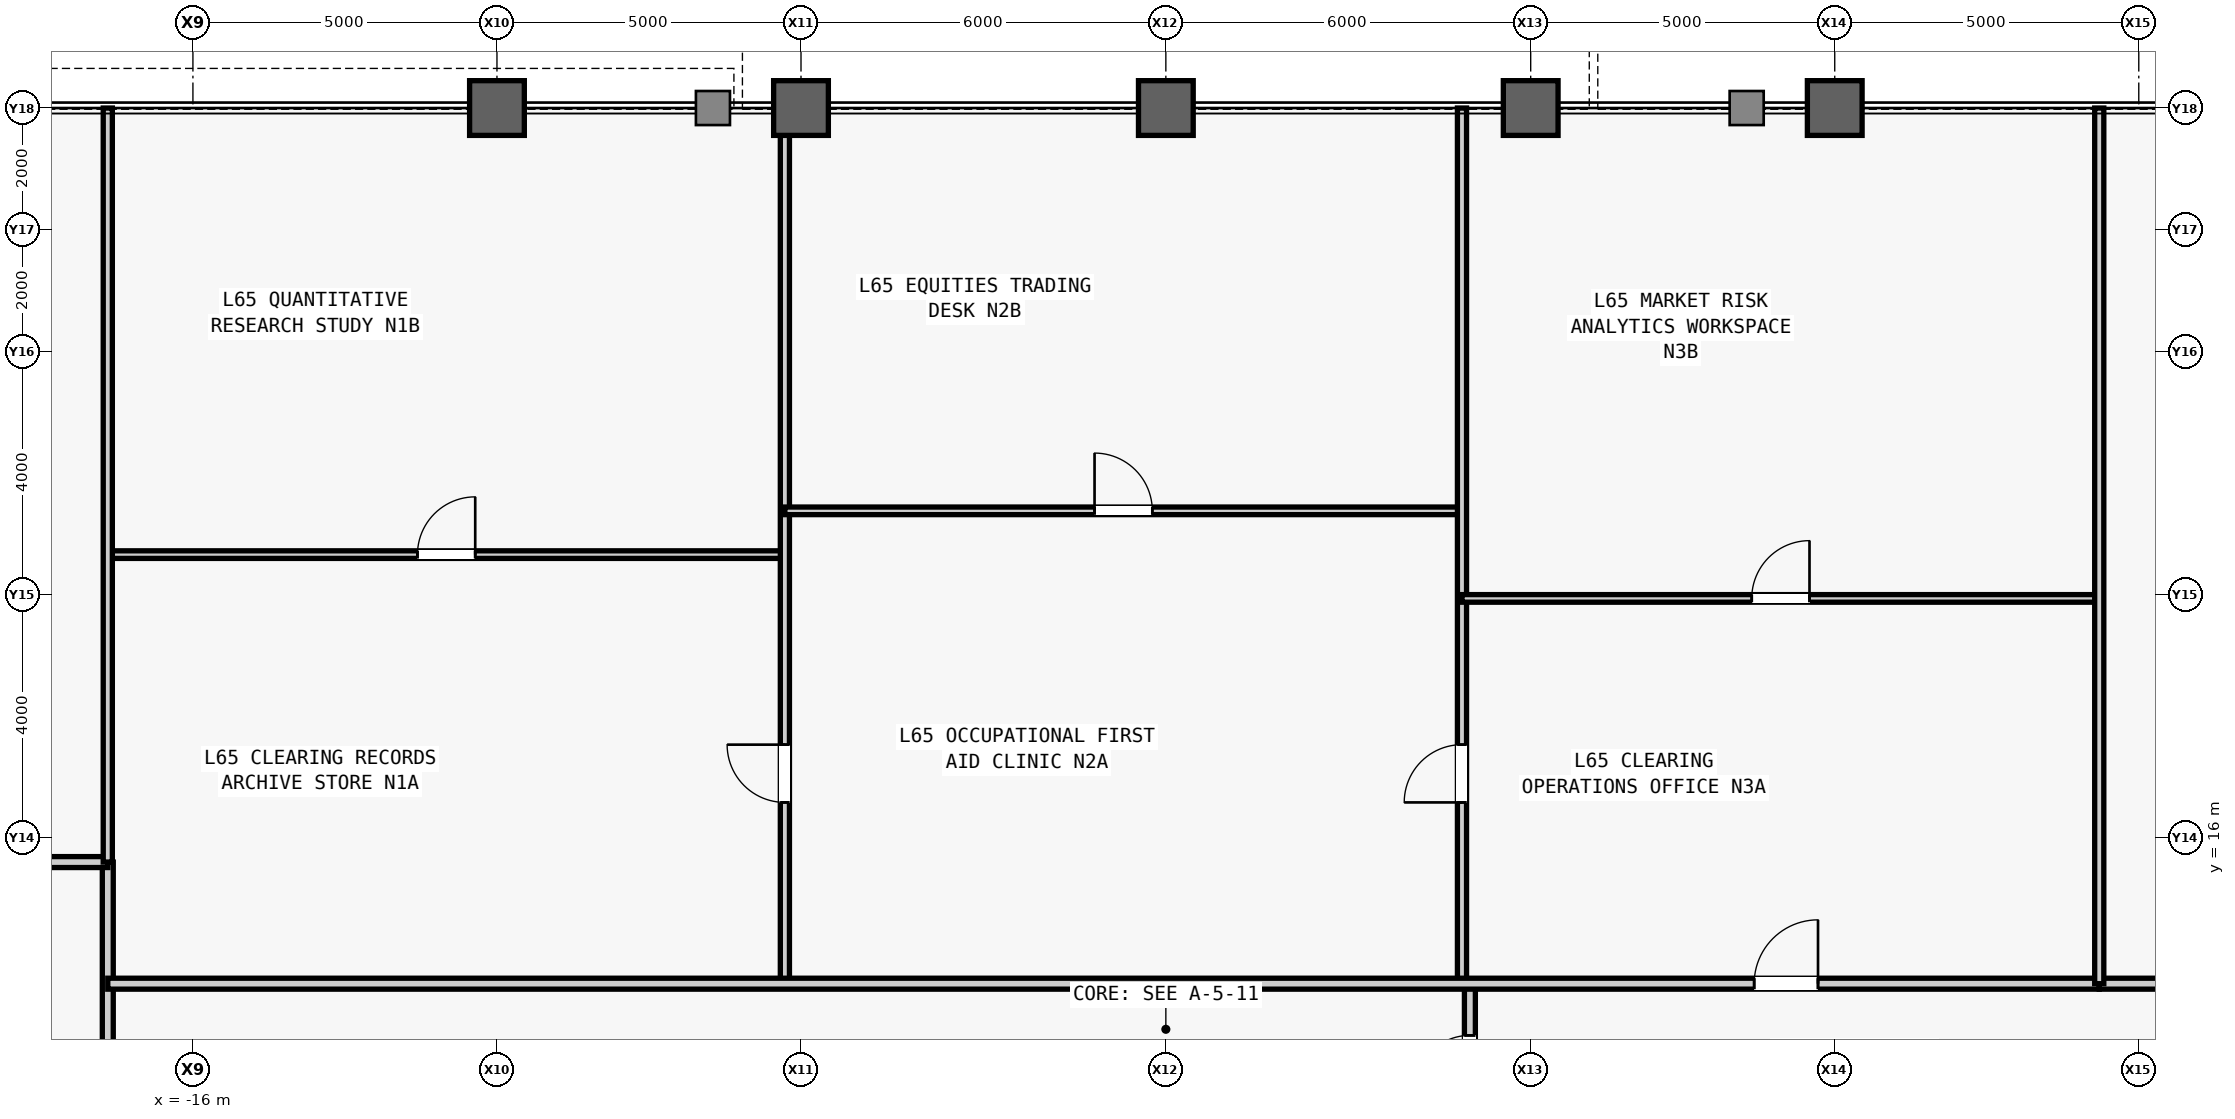
"""IFC4 building model, lengths in metres.
Left out: names, types, materials, properties, quantities, classifications, styles, units other than length and angle.
Written with IfcOpenShell. Run it as: python <this file> out.ifc"""

import sys

from ifc_helpers import new_model, si_unit, direction, frame, frame_2d, origin, origin_2d, place, context, subcontext, project, spatial, rectangle, hollow_rectangle, extrude, source, transform, mapped, element, fill, save


model = new_model("IFC4")
c1 = context("Model", 3, precision=1e-05, world=origin(), true_north=direction((0.0, 1.0)))
c2 = subcontext(c1, "Body", "Model", "MODEL_VIEW")
j1 = project(units=[si_unit("LENGTHUNIT", "METRE"), si_unit("PLANEANGLEUNIT", "RADIAN")], contexts=[c1])
p1 = place(None, origin())
s1 = spatial("IfcSite", under=j1, at=p1, CompositionType="ELEMENT")
p2 = place(p1, origin())
s2 = spatial("IfcBuilding", under=s1, at=p2, CompositionType="ELEMENT")
p3 = place(p2, frame((0.0, 0.0, 277.5)))
s3 = spatial("IfcBuildingStorey", under=s2, at=p3, CompositionType="ELEMENT", Elevation=277.5)
m1 = source(origin(), c2, "Body", "SweptSolid", [
    extrude(hollow_rectangle(XDim=0.9, YDim=0.9, WallThickness=0.05, at=origin_2d()), origin(), (0.0, 0.0, 1.0), 4.0),
])
for number, where, z_axis, x_axis in (
    (1, (-11.0, 28.0, 0.0), (0.0, 0.0, 1.0), (1.0, 0.0, 0.0)),
    (2, (-6.0, 28.0, 0.0), (0.0, 0.0, 1.0), (1.0, 0.0, 0.0)),
    (3, (0.0, 28.0, 0.0), (0.0, 0.0, 1.0), (1.0, 0.0, 0.0)),
    (4, (6.0, 28.0, 0.0), (0.0, 0.0, 1.0), (1.0, 0.0, 0.0)),
    (5, (11.0, 28.0, 0.0), (0.0, 0.0, 1.0), (1.0, 0.0, 0.0)),
):
    element("IfcColumn", number, at=place(p3, frame(where, z_axis=z_axis, x_axis=x_axis)), inside=s3, PredefinedType="COLUMN", context=c2, shape_type="MappedRepresentation", body=[
        mapped(m1, transform((0.0, 0.0, 0.0), scale=1.0)),
    ])
m2 = source(origin(), c2, "Body", "SweptSolid", [
    extrude(rectangle(XDim=8.4, YDim=0.18, at=frame_2d((4.2, 0.0))), origin(), (0.0, 0.0, 1.0), 3.78),
])
p4 = place(p3, frame((-17.4, 7.2, 0.0), z_axis=(0.0, 0.0, 1.0), x_axis=(0.0, 1.0, 0.0)))
e6 = element("IfcWall", 6, at=p4, inside=s3, PredefinedType="PARTITIONING", context=c2, shape_type="MappedRepresentation", body=[
    mapped(m2, transform((0.0, 0.0, 0.0), scale=1.0)),
])
m3 = source(origin(), c2, "Body", "SweptSolid", [
    extrude(rectangle(XDim=2.6, YDim=0.18, at=frame_2d((1.3, 0.0))), origin(), (0.0, 0.0, 1.0), 3.78),
])
p5 = place(p3, frame((5.0, 11.0, 0.0), z_axis=(0.0, 0.0, 1.0), x_axis=(0.0, 1.0, 0.0)))
e7 = element("IfcWall", 7, at=p5, inside=s3, PredefinedType="PARTITIONING", context=c2, shape_type="MappedRepresentation", body=[
    mapped(m3, transform((0.0, 0.0, 0.0), scale=1.0)),
])
m4 = source(origin(), c2, "Body", "SweptSolid", [
    extrude(rectangle(XDim=0.9, YDim=2.15, at=frame_2d((0.45, 1.075))), frame((0.0, 0.1, 0.0), z_axis=(0.0, -1.0, 0.0), x_axis=(1.0, 0.0, 0.0)), (0.0, 0.0, 1.0), 0.2),
])
p6 = place(p5, frame((0.85, 0.0, 0.0)))
e8 = element("IfcOpeningElement", 8, at=p6, cuts=e7, PredefinedType="OPENING", context=c2, shape_type="MappedRepresentation", body=[
    mapped(m4, transform((0.0, 0.0, 0.0), scale=1.0)),
])
m5 = source(origin(), c2, "Body", "SweptSolid", [
    extrude(rectangle(XDim=2.4, YDim=0.18, at=frame_2d((1.2, 0.0))), origin(), (0.0, 0.0, 1.0), 3.78),
])
p7 = place(p3, frame((-19.8, 15.6, 0.0), z_axis=(0.0, 0.0, 1.0), x_axis=(1.0, 0.0, 0.0)))
e9 = element("IfcWall", 9, at=p7, inside=s3, PredefinedType="PARTITIONING", context=c2, shape_type="MappedRepresentation", body=[
    mapped(m5, transform((0.0, 0.0, 0.0), scale=1.0)),
])
m6 = source(origin(), c2, "Body", "SweptSolid", [
    extrude(rectangle(XDim=2.4, YDim=0.18, at=frame_2d((1.2, 0.0))), origin(), (0.0, 0.0, 1.0), 3.78),
])
p8 = place(p3, frame((15.35, 13.6, 0.0), z_axis=(0.0, 0.0, 1.0), x_axis=(1.0, 0.0, 0.0)))
e10 = element("IfcWall", 10, at=p8, inside=s3, PredefinedType="PARTITIONING", context=c2, shape_type="MappedRepresentation", body=[
    mapped(m6, transform((0.0, 0.0, 0.0), scale=1.0)),
])
m7 = source(origin(), c2, "Body", "SweptSolid", [
    extrude(rectangle(XDim=11.135, YDim=0.125, at=frame_2d((5.567, 0.0))), origin(), (0.0, 0.0, 1.0), 3.78),
])
p9 = place(p3, frame((-17.4, 20.656, 0.0), z_axis=(0.0, 0.0, 1.0), x_axis=(1.0, 0.0, 0.0)))
e11 = element("IfcWall", 11, at=p9, inside=s3, PredefinedType="PARTITIONING", context=c2, shape_type="MappedRepresentation", body=[
    mapped(m7, transform((0.0, 0.0, 0.0), scale=1.0)),
])
m8 = source(origin(), c2, "Body", "SweptSolid", [
    extrude(rectangle(XDim=0.95, YDim=2.15, at=frame_2d((0.475, 1.075))), frame((0.0, 0.073, 0.0), z_axis=(0.0, -1.0, 0.0), x_axis=(1.0, 0.0, 0.0)), (0.0, 0.0, 1.0), 0.145),
])
p10 = place(p9, frame((5.093, 0.0, 0.0)))
e12 = element("IfcOpeningElement", 12, at=p10, cuts=e11, PredefinedType="OPENING", context=c2, shape_type="MappedRepresentation", body=[
    mapped(m8, transform((0.0, 0.0, 0.0), scale=1.0)),
])
m9 = source(origin(), c2, "Body", "SweptSolid", [
    extrude(rectangle(XDim=14.4, YDim=0.15, at=frame_2d((7.2, 0.0))), origin(), (0.0, 0.0, 1.0), 3.085),
])
p11 = place(p3, frame((-6.265, 13.6, 0.0), z_axis=(0.0, 0.0, 1.0), x_axis=(0.0, 1.0, 0.0)))
e13 = element("IfcWall", 13, at=p11, inside=s3, PredefinedType="PARTITIONING", context=c2, shape_type="MappedRepresentation", body=[
    mapped(m9, transform((0.0, 0.0, 0.0), scale=1.0)),
])
m10 = source(origin(), c2, "Body", "SweptSolid", [
    extrude(rectangle(XDim=0.95, YDim=2.15, at=frame_2d((0.475, 1.075))), frame((0.0, 0.085, 0.0), z_axis=(0.0, -1.0, 0.0), x_axis=(1.0, 0.0, 0.0)), (0.0, 0.0, 1.0), 0.17),
])
p12 = place(p11, frame((2.981, 0.0, 0.0)))
e14 = element("IfcOpeningElement", 14, at=p12, cuts=e13, PredefinedType="OPENING", context=c2, shape_type="MappedRepresentation", body=[
    mapped(m10, transform((0.0, 0.0, 0.0), scale=1.0)),
])
p13 = place(p3, frame((-6.265, 21.376, 0.0), z_axis=(0.0, 0.0, 1.0), x_axis=(1.0, 0.0, 0.0)))
e15 = element("IfcWall", 15, at=p13, inside=s3, PredefinedType="PARTITIONING", context=c2, shape_type="MappedRepresentation", body=[
    mapped(m7, transform((0.0, 0.0, 0.0), scale=1.0)),
])
p14 = place(p13, frame((5.093, 0.0, 0.0)))
e16 = element("IfcOpeningElement", 16, at=p14, cuts=e15, PredefinedType="OPENING", context=c2, shape_type="MappedRepresentation", body=[
    mapped(m8, transform((0.0, 0.0, 0.0), scale=1.0)),
])
m11 = source(origin(), c2, "Body", "SweptSolid", [
    extrude(rectangle(XDim=14.4, YDim=0.15, at=frame_2d((7.2, 0.0))), origin(), (0.0, 0.0, 1.0), 3.78),
])
p15 = place(p3, frame((4.87, 13.6, 0.0), z_axis=(0.0, 0.0, 1.0), x_axis=(0.0, 1.0, 0.0)))
e17 = element("IfcWall", 17, at=p15, inside=s3, PredefinedType="PARTITIONING", context=c2, shape_type="MappedRepresentation", body=[
    mapped(m11, transform((0.0, 0.0, 0.0), scale=1.0)),
])
p16 = place(p15, frame((2.981, 0.0, 0.0)))
e18 = element("IfcOpeningElement", 18, at=p16, cuts=e17, PredefinedType="OPENING", context=c2, shape_type="MappedRepresentation", body=[
    mapped(m10, transform((0.0, 0.0, 0.0), scale=1.0)),
])
m12 = source(origin(), c2, "Body", "SweptSolid", [
    extrude(rectangle(XDim=10.48, YDim=0.125, at=frame_2d((5.24, 0.0))), origin(), (0.0, 0.0, 1.0), 3.78),
])
p17 = place(p3, frame((4.87, 19.936, 0.0), z_axis=(0.0, 0.0, 1.0), x_axis=(1.0, 0.0, 0.0)))
e19 = element("IfcWall", 19, at=p17, inside=s3, PredefinedType="PARTITIONING", context=c2, shape_type="MappedRepresentation", body=[
    mapped(m12, transform((0.0, 0.0, 0.0), scale=1.0)),
])
p18 = place(p17, frame((4.765, 0.0, 0.0)))
e20 = element("IfcOpeningElement", 20, at=p18, cuts=e19, PredefinedType="OPENING", context=c2, shape_type="MappedRepresentation", body=[
    mapped(m8, transform((0.0, 0.0, 0.0), scale=1.0)),
])
m13 = source(origin(), c2, "Body", "SweptSolid", [
    extrude(rectangle(XDim=32.75, YDim=0.18, at=frame_2d((16.375, 0.0))), origin(), (0.0, 0.0, 1.0), 3.78),
])
p19 = place(p3, frame((-17.4, 13.6, 0.0), z_axis=(0.0, 0.0, 1.0), x_axis=(1.0, 0.0, 0.0)))
e21 = element("IfcWall", 21, at=p19, inside=s3, PredefinedType="PARTITIONING", context=c2, shape_type="MappedRepresentation", body=[
    mapped(m13, transform((0.0, 0.0, 0.0), scale=1.0)),
])
m14 = source(origin(), c2, "Body", "SweptSolid", [
    extrude(rectangle(XDim=1.05, YDim=2.2, at=frame_2d((0.525, 1.1))), frame((0.0, 0.1, 0.0), z_axis=(0.0, -1.0, 0.0), x_axis=(1.0, 0.0, 0.0)), (0.0, 0.0, 1.0), 0.2),
])
p20 = place(p19, frame((27.075, 0.0, 0.0)))
e22 = element("IfcOpeningElement", 22, at=p20, cuts=e21, PredefinedType="OPENING", context=c2, shape_type="MappedRepresentation", body=[
    mapped(m14, transform((0.0, 0.0, 0.0), scale=1.0)),
])
m15 = source(origin(), c2, "Body", "SweptSolid", [
    extrude(rectangle(XDim=12.4, YDim=0.15, at=frame_2d((6.2, 0.0))), origin(), (0.0, 0.0, 1.0), 3.78),
])
p21 = place(p3, frame((-17.4, 15.6, 0.0), z_axis=(0.0, 0.0, 1.0), x_axis=(0.0, 1.0, 0.0)))
e23 = element("IfcWall", 23, at=p21, inside=s3, PredefinedType="PARTITIONING", context=c2, shape_type="MappedRepresentation", body=[
    mapped(m15, transform((0.0, 0.0, 0.0), scale=1.0)),
])
p22 = place(p3, frame((15.35, 13.6, 0.0), z_axis=(0.0, 0.0, 1.0), x_axis=(0.0, 1.0, 0.0)))
e24 = element("IfcWall", 24, at=p22, inside=s3, PredefinedType="PARTITIONING", context=c2, shape_type="MappedRepresentation", body=[
    mapped(m11, transform((0.0, 0.0, 0.0), scale=1.0)),
])
m16 = source(origin(), c2, "Body", "SweptSolid", [
    extrude(rectangle(XDim=0.9, YDim=2.15, at=frame_2d((0.45, 1.075))), frame((0.0, 0.025, 0.0), z_axis=(0.0, -1.0, 0.0), x_axis=(1.0, 0.0, 0.0)), (0.0, 0.0, 1.0), 0.05),
])
p23 = place(p6, origin())
e25 = element("IfcDoor", 25, at=p23, inside=s3, OperationType="SINGLE_SWING_LEFT", PredefinedType="DOOR", context=c2, shape_type="MappedRepresentation", body=[
    mapped(m16, transform((0.0, 0.0, 0.0), scale=1.0)),
])
fill(e8, e25)
m17 = source(origin(), c2, "Body", "SweptSolid", [
    extrude(rectangle(XDim=0.95, YDim=2.15, at=frame_2d((0.475, 1.075))), frame((0.0, 0.025, 0.0), z_axis=(0.0, -1.0, 0.0), x_axis=(1.0, 0.0, 0.0)), (0.0, 0.0, 1.0), 0.05),
])
p24 = place(p10, origin())
e26 = element("IfcDoor", 26, at=p24, inside=s3, OperationType="SINGLE_SWING_RIGHT", PredefinedType="DOOR", context=c2, shape_type="MappedRepresentation", body=[
    mapped(m17, transform((0.0, 0.0, 0.0), scale=1.0)),
])
fill(e12, e26)
p25 = place(p12, origin())
e27 = element("IfcDoor", 27, at=p25, inside=s3, OperationType="SINGLE_SWING_RIGHT", PredefinedType="DOOR", context=c2, shape_type="MappedRepresentation", body=[
    mapped(m17, transform((0.0, 0.0, 0.0), scale=1.0)),
])
fill(e14, e27)
p26 = place(p14, origin())
e28 = element("IfcDoor", 28, at=p26, inside=s3, OperationType="SINGLE_SWING_LEFT", PredefinedType="DOOR", context=c2, shape_type="MappedRepresentation", body=[
    mapped(m17, transform((0.0, 0.0, 0.0), scale=1.0)),
])
fill(e16, e28)
p27 = place(p16, origin())
e29 = element("IfcDoor", 29, at=p27, inside=s3, OperationType="SINGLE_SWING_LEFT", PredefinedType="DOOR", context=c2, shape_type="MappedRepresentation", body=[
    mapped(m17, transform((0.0, 0.0, 0.0), scale=1.0)),
])
fill(e18, e29)
p28 = place(p18, origin())
e30 = element("IfcDoor", 30, at=p28, inside=s3, OperationType="SINGLE_SWING_RIGHT", PredefinedType="DOOR", context=c2, shape_type="MappedRepresentation", body=[
    mapped(m17, transform((0.0, 0.0, 0.0), scale=1.0)),
])
fill(e20, e30)
m18 = source(origin(), c2, "Body", "SweptSolid", [
    extrude(rectangle(XDim=1.05, YDim=2.2, at=frame_2d((0.525, 1.1))), frame((0.0, 0.025, 0.0), z_axis=(0.0, -1.0, 0.0), x_axis=(1.0, 0.0, 0.0)), (0.0, 0.0, 1.0), 0.05),
])
p29 = place(p20, origin())
e31 = element("IfcDoor", 31, at=p29, inside=s3, OperationType="SINGLE_SWING_RIGHT", PredefinedType="DOOR", context=c2, shape_type="MappedRepresentation", body=[
    mapped(m18, transform((0.0, 0.0, 0.0), scale=1.0)),
])
fill(e22, e31)
save(model, sys.argv[1])
